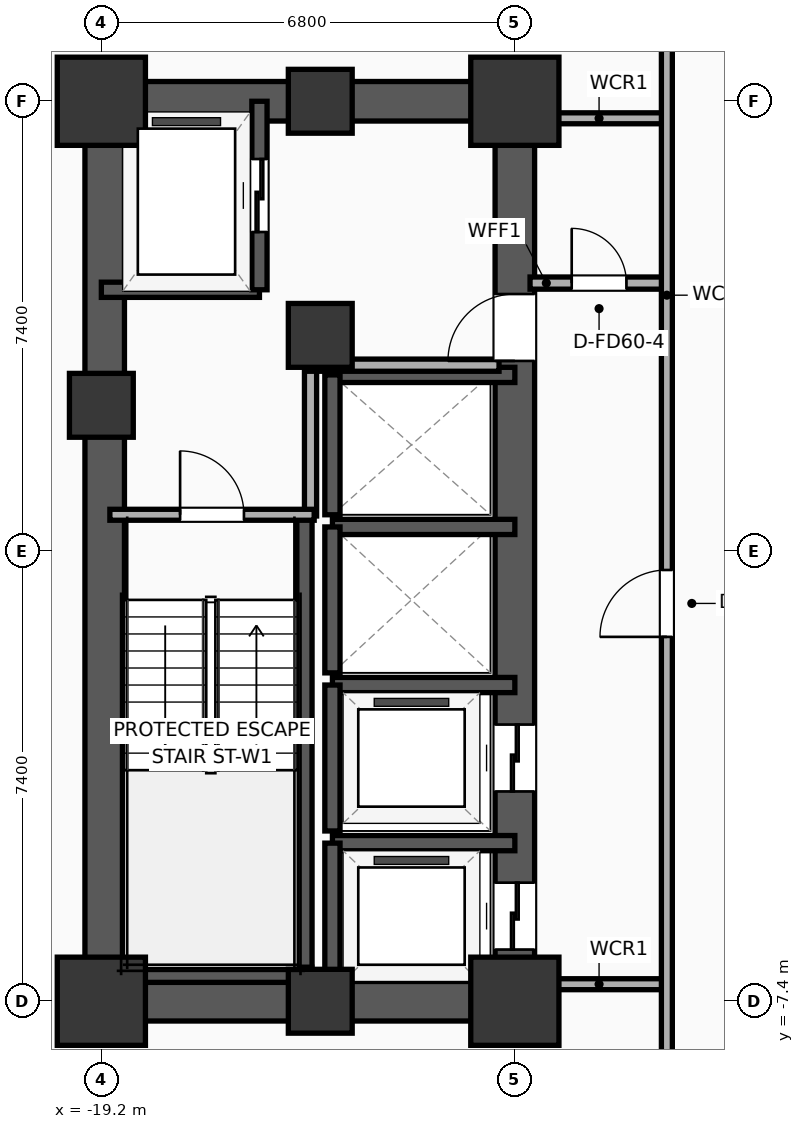
"""IFC4 building model, lengths in metres.
Left out: names, types, materials, properties, quantities, classifications, styles, units other than length and angle.
Written with IfcOpenShell. Run it as: python <this file> out.ifc"""

import sys

from ifc_helpers import new_model, si_unit, direction, frame, frame_2d, origin, origin_2d, place, context, subcontext, project, spatial, rectangle, extrude, element, fill, save


model = new_model("IFC4")
c1 = context("Model", 3, precision=1e-05, world=origin(), true_north=direction((0.0, 1.0)))
c2 = subcontext(c1, "Body", "Model", "MODEL_VIEW")
j1 = project(units=[si_unit("LENGTHUNIT", "METRE"), si_unit("PLANEANGLEUNIT", "RADIAN")], contexts=[c1])
p1 = place(None, origin())
s1 = spatial("IfcSite", under=j1, at=p1, CompositionType="ELEMENT")
p2 = place(p1, origin())
s2 = spatial("IfcBuilding", under=s1, at=p2, CompositionType="ELEMENT")
p3 = place(p2, frame((0.0, 0.0, 37.7)))
s3 = spatial("IfcBuildingStorey", under=s2, at=p3, CompositionType="ELEMENT", Elevation=37.7)
p4 = place(p3, frame((-19.2, -7.4, 0.0), z_axis=(0.0, 0.0, 1.0), x_axis=(1.0, 0.0, 0.0)))
e1 = element("IfcColumn", 1, at=p4, inside=s3, PredefinedType="COLUMN", context=c2, shape_type="SweptSolid", body=[
    extrude(rectangle(XDim=1.45, YDim=1.45, at=origin_2d()), origin(), (0.0, 0.0, 1.0), 3.9),
])
p5 = place(p3, frame((-19.2, 2.4, 0.0), z_axis=(0.0, 0.0, 1.0), x_axis=(1.0, 0.0, 0.0)))
e2 = element("IfcColumn", 2, at=p5, inside=s3, PredefinedType="COLUMN", context=c2, shape_type="SweptSolid", body=[
    extrude(rectangle(XDim=1.05, YDim=1.05, at=origin_2d()), origin(), (0.0, 0.0, 1.0), 3.9),
])
p6 = place(p3, frame((-19.2, 7.4, 0.0), z_axis=(0.0, 0.0, 1.0), x_axis=(1.0, 0.0, 0.0)))
e3 = element("IfcColumn", 3, at=p6, inside=s3, PredefinedType="COLUMN", context=c2, shape_type="SweptSolid", body=[
    extrude(rectangle(XDim=1.45, YDim=1.45, at=origin_2d()), origin(), (0.0, 0.0, 1.0), 3.9),
])
for number, where, z_axis, x_axis in (
    (4, (-15.6, -7.4, 0.0), (0.0, 0.0, 1.0), (1.0, 0.0, 0.0)),
    (5, (-15.6, 7.4, 0.0), (0.0, 0.0, 1.0), (1.0, 0.0, 0.0)),
):
    element("IfcColumn", number, at=place(p3, frame(where, z_axis=z_axis, x_axis=x_axis)), inside=s3, PredefinedType="COLUMN", context=c2, shape_type="SweptSolid", body=[
        extrude(rectangle(XDim=1.05, YDim=1.05, at=origin_2d()), origin(), (0.0, 0.0, 1.0), 3.9),
    ])
p7 = place(p3, frame((-12.4, -7.4, 0.0), z_axis=(0.0, 0.0, 1.0), x_axis=(1.0, 0.0, 0.0)))
e6 = element("IfcColumn", 6, at=p7, inside=s3, PredefinedType="COLUMN", context=c2, shape_type="SweptSolid", body=[
    extrude(rectangle(XDim=1.45, YDim=1.45, at=origin_2d()), origin(), (0.0, 0.0, 1.0), 3.9),
])
p8 = place(p3, frame((-15.6, 3.55, 0.0), z_axis=(0.0, 0.0, 1.0), x_axis=(1.0, 0.0, 0.0)))
e7 = element("IfcColumn", 7, at=p8, inside=s3, PredefinedType="COLUMN", context=c2, shape_type="SweptSolid", body=[
    extrude(rectangle(XDim=1.05, YDim=1.05, at=origin_2d()), origin(), (0.0, 0.0, 1.0), 3.9),
])
p9 = place(p3, frame((-12.4, 7.4, 0.0), z_axis=(0.0, 0.0, 1.0), x_axis=(1.0, 0.0, 0.0)))
e8 = element("IfcColumn", 8, at=p9, inside=s3, PredefinedType="COLUMN", context=c2, shape_type="SweptSolid", body=[
    extrude(rectangle(XDim=1.45, YDim=1.45, at=origin_2d()), origin(), (0.0, 0.0, 1.0), 3.9),
])
for number, where, z_axis, x_axis in (
    (9, (-19.525, -7.4, 0.0), (0.0, 0.0, 1.0), (1.0, 0.0, 0.0)),
    (10, (-19.525, 7.4, 0.0), (0.0, 0.0, 1.0), (1.0, 0.0, 0.0)),
):
    element("IfcWall", number, at=place(p3, frame(where, z_axis=z_axis, x_axis=x_axis)), inside=s3, PredefinedType="SHEAR", context=c2, shape_type="SweptSolid", body=[
        extrude(rectangle(XDim=7.45, YDim=0.65, at=frame_2d((3.725, 0.0))), origin(), (0.0, 0.0, 1.0), 3.65),
    ])
p10 = place(p3, frame((-19.145, -7.4, 0.0), z_axis=(0.0, 0.0, 1.0), x_axis=(0.0, 1.0, 0.0)))
e11 = element("IfcWall", 11, at=p10, inside=s3, PredefinedType="SHEAR", context=c2, shape_type="SweptSolid", body=[
    extrude(rectangle(XDim=14.8, YDim=0.65, at=frame_2d((7.4, 0.0))), origin(), (0.0, 0.0, 1.0), 3.65),
])
p11 = place(p3, frame((-12.4, -7.4, 0.0), z_axis=(0.0, 0.0, 1.0), x_axis=(0.0, 1.0, 0.0)))
e12 = element("IfcWall", 12, at=p11, inside=s3, PredefinedType="SHEAR", context=c2, shape_type="SweptSolid", body=[
    extrude(rectangle(XDim=14.8, YDim=0.65, at=frame_2d((7.4, 0.0))), origin(), (0.0, 0.0, 1.0), 3.65),
])
p12 = place(p11, frame((0.85, 0.0, 0.0)))
e13 = element("IfcOpeningElement", 13, at=p12, cuts=e12, PredefinedType="OPENING", context=c2, shape_type="SweptSolid", body=[
    extrude(rectangle(XDim=1.1, YDim=2.05, at=frame_2d((0.55, 1.025))), frame((0.0, 0.335, 0.0), z_axis=(0.0, -1.0, 0.0), x_axis=(1.0, 0.0, 0.0)), (0.0, 0.0, 1.0), 0.67),
])
p13 = place(p11, frame((3.45, 0.0, 0.0)))
e14 = element("IfcOpeningElement", 14, at=p13, cuts=e12, PredefinedType="OPENING", context=c2, shape_type="SweptSolid", body=[
    extrude(rectangle(XDim=1.1, YDim=2.05, at=frame_2d((0.55, 1.025))), frame((0.0, 0.335, 0.0), z_axis=(0.0, -1.0, 0.0), x_axis=(1.0, 0.0, 0.0)), (0.0, 0.0, 1.0), 0.67),
])
p14 = place(p11, frame((10.53, 0.0, 0.0)))
e15 = element("IfcOpeningElement", 15, at=p14, cuts=e12, PredefinedType="OPENING", context=c2, shape_type="SweptSolid", body=[
    extrude(rectangle(XDim=1.1, YDim=2.05, at=frame_2d((0.55, 1.025))), frame((0.0, 0.335, 0.0), z_axis=(0.0, -1.0, 0.0), x_axis=(1.0, 0.0, 0.0)), (0.0, 0.0, 1.0), 0.67),
])
p15 = place(p3, frame((-15.86, -7.085, 0.0), z_axis=(0.0, 0.0, 1.0), x_axis=(0.0, 1.0, 0.0)))
e16 = element("IfcWall", 16, at=p15, inside=s3, PredefinedType="SOLIDWALL", context=c2, shape_type="SweptSolid", body=[
    extrude(rectangle(XDim=7.685, YDim=0.25, at=frame_2d((3.843, 0.0))), origin(), (0.0, 0.0, 1.0), 3.65),
])
p16 = place(p3, frame((-19.2, -6.965, 0.0), z_axis=(0.0, 0.0, 1.0), x_axis=(1.0, 0.0, 0.0)))
e17 = element("IfcWall", 17, at=p16, inside=s3, PredefinedType="SOLIDWALL", context=c2, shape_type="SweptSolid", body=[
    extrude(rectangle(XDim=3.46, YDim=0.25, at=frame_2d((1.73, 0.0))), origin(), (0.0, 0.0, 1.0), 3.65),
])
p17 = place(p3, frame((-19.2, 4.3, 0.0), z_axis=(0.0, 0.0, 1.0), x_axis=(1.0, 0.0, 0.0)))
e18 = element("IfcWall", 18, at=p17, inside=s3, PredefinedType="SOLIDWALL", context=c2, shape_type="SweptSolid", body=[
    extrude(rectangle(XDim=2.6, YDim=0.25, at=frame_2d((1.3, 0.0))), origin(), (0.0, 0.0, 1.0), 3.65),
])
p18 = place(p3, frame((-16.6, 4.3, 0.0), z_axis=(0.0, 0.0, 1.0), x_axis=(0.0, 1.0, 0.0)))
e19 = element("IfcWall", 19, at=p18, inside=s3, PredefinedType="SOLIDWALL", context=c2, shape_type="SweptSolid", body=[
    extrude(rectangle(XDim=3.1, YDim=0.25, at=frame_2d((1.55, 0.0))), origin(), (0.0, 0.0, 1.0), 3.65),
])
p19 = place(p18, frame((0.95, 0.0, 0.0)))
e20 = element("IfcOpeningElement", 20, at=p19, cuts=e19, PredefinedType="OPENING", context=c2, shape_type="SweptSolid", body=[
    extrude(rectangle(XDim=1.2, YDim=2.05, at=frame_2d((0.6, 1.025))), frame((0.0, 0.135, 0.0), z_axis=(0.0, -1.0, 0.0), x_axis=(1.0, 0.0, 0.0)), (0.0, 0.0, 1.0), 0.27),
])
p20 = place(p3, frame((-12.4, -4.8, 0.0), z_axis=(0.0, 0.0, 1.0), x_axis=(-1.0, 0.0, 0.0)))
e21 = element("IfcWall", 21, at=p20, inside=s3, PredefinedType="SOLIDWALL", context=c2, shape_type="SweptSolid", body=[
    extrude(rectangle(XDim=3.0, YDim=0.25, at=frame_2d((1.5, 0.0))), origin(), (0.0, 0.0, 1.0), 3.65),
])
p21 = place(p3, frame((-15.4, -4.8, 0.0), z_axis=(0.0, 0.0, 1.0), x_axis=(0.0, -1.0, 0.0)))
e22 = element("IfcWall", 22, at=p21, inside=s3, PredefinedType="SOLIDWALL", context=c2, shape_type="SweptSolid", body=[
    extrude(rectangle(XDim=2.6, YDim=0.25, at=frame_2d((1.3, 0.0))), origin(), (0.0, 0.0, 1.0), 3.65),
])
p22 = place(p3, frame((-12.4, -2.2, 0.0), z_axis=(0.0, 0.0, 1.0), x_axis=(-1.0, 0.0, 0.0)))
e23 = element("IfcWall", 23, at=p22, inside=s3, PredefinedType="SOLIDWALL", context=c2, shape_type="SweptSolid", body=[
    extrude(rectangle(XDim=3.0, YDim=0.25, at=frame_2d((1.5, 0.0))), origin(), (0.0, 0.0, 1.0), 3.65),
])
p23 = place(p3, frame((-15.4, -2.2, 0.0), z_axis=(0.0, 0.0, 1.0), x_axis=(0.0, -1.0, 0.0)))
e24 = element("IfcWall", 24, at=p23, inside=s3, PredefinedType="SOLIDWALL", context=c2, shape_type="SweptSolid", body=[
    extrude(rectangle(XDim=2.4, YDim=0.25, at=frame_2d((1.2, 0.0))), origin(), (0.0, 0.0, 1.0), 3.65),
])
p24 = place(p3, frame((-12.4, 0.4, 0.0), z_axis=(0.0, 0.0, 1.0), x_axis=(-1.0, 0.0, 0.0)))
e25 = element("IfcWall", 25, at=p24, inside=s3, PredefinedType="SOLIDWALL", context=c2, shape_type="SweptSolid", body=[
    extrude(rectangle(XDim=3.0, YDim=0.25, at=frame_2d((1.5, 0.0))), origin(), (0.0, 0.0, 1.0), 3.65),
])
p25 = place(p3, frame((-15.4, 0.4, 0.0), z_axis=(0.0, 0.0, 1.0), x_axis=(0.0, -1.0, 0.0)))
e26 = element("IfcWall", 26, at=p25, inside=s3, PredefinedType="SOLIDWALL", context=c2, shape_type="SweptSolid", body=[
    extrude(rectangle(XDim=2.4, YDim=0.25, at=frame_2d((1.2, 0.0))), origin(), (0.0, 0.0, 1.0), 3.65),
])
p26 = place(p3, frame((-12.4, 2.9, 0.0), z_axis=(0.0, 0.0, 1.0), x_axis=(-1.0, 0.0, 0.0)))
e27 = element("IfcWall", 27, at=p26, inside=s3, PredefinedType="SOLIDWALL", context=c2, shape_type="SweptSolid", body=[
    extrude(rectangle(XDim=3.0, YDim=0.25, at=frame_2d((1.5, 0.0))), origin(), (0.0, 0.0, 1.0), 3.65),
])
p27 = place(p3, frame((-15.4, 2.9, 0.0), z_axis=(0.0, 0.0, 1.0), x_axis=(0.0, -1.0, 0.0)))
e28 = element("IfcWall", 28, at=p27, inside=s3, PredefinedType="SOLIDWALL", context=c2, shape_type="SweptSolid", body=[
    extrude(rectangle(XDim=2.3, YDim=0.25, at=frame_2d((1.15, 0.0))), origin(), (0.0, 0.0, 1.0), 3.65),
])
p28 = place(p3, frame((-15.76, 0.58, 0.0), z_axis=(0.0, 0.0, 1.0), x_axis=(0.0, 1.0, 0.0)))
e29 = element("IfcWall", 29, at=p28, inside=s3, PredefinedType="PARTITIONING", context=c2, shape_type="SweptSolid", body=[
    extrude(rectangle(XDim=2.52, YDim=0.2, at=frame_2d((1.26, 0.0))), origin(), (0.0, 0.0, 1.0), 3.65),
])
p29 = place(p3, frame((-15.82, 3.06, 0.0), z_axis=(0.0, 0.0, 1.0), x_axis=(1.0, 0.0, 0.0)))
e30 = element("IfcWall", 30, at=p29, inside=s3, PredefinedType="PARTITIONING", context=c2, shape_type="SweptSolid", body=[
    extrude(rectangle(XDim=3.16, YDim=0.2, at=frame_2d((1.58, 0.0))), origin(), (0.0, 0.0, 1.0), 3.65),
])
p30 = place(p3, frame((-19.06, 0.6, 0.0), z_axis=(0.0, 0.0, 1.0), x_axis=(1.0, 0.0, 0.0)))
e31 = element("IfcWall", 31, at=p30, inside=s3, PredefinedType="PARTITIONING", context=c2, shape_type="SweptSolid", body=[
    extrude(rectangle(XDim=3.36, YDim=0.18, at=frame_2d((1.68, 0.0))), origin(), (0.0, 0.0, 1.0), 3.65),
])
p31 = place(p30, frame((1.155, 0.0, 0.0)))
e32 = element("IfcOpeningElement", 32, at=p31, cuts=e31, PredefinedType="OPENING", context=c2, shape_type="SweptSolid", body=[
    extrude(rectangle(XDim=1.05, YDim=2.05, at=frame_2d((0.525, 1.025))), frame((0.0, 0.1, 0.0), z_axis=(0.0, -1.0, 0.0), x_axis=(1.0, 0.0, 0.0)), (0.0, 0.0, 1.0), 0.2),
])
p32 = place(p3, frame((-12.15, 4.41, 0.0), z_axis=(0.0, 0.0, 1.0), x_axis=(1.0, 0.0, 0.0)))
e33 = element("IfcWall", 33, at=p32, inside=s3, PredefinedType="PARTITIONING", context=c2, shape_type="SweptSolid", body=[
    extrude(rectangle(XDim=2.27, YDim=0.2, at=frame_2d((1.135, 0.0))), origin(), (0.0, 0.0, 1.0), 3.65),
])
p33 = place(p32, frame((0.685, 0.0, 0.0)))
e34 = element("IfcOpeningElement", 34, at=p33, cuts=e33, PredefinedType="OPENING", context=c2, shape_type="SweptSolid", body=[
    extrude(rectangle(XDim=0.9, YDim=2.05, at=frame_2d((0.45, 1.025))), frame((0.0, 0.11, 0.0), z_axis=(0.0, -1.0, 0.0), x_axis=(1.0, 0.0, 0.0)), (0.0, 0.0, 1.0), 0.22),
])
for number, where, z_axis, x_axis in (
    (35, (-12.15, 7.12, 0.0), (0.0, 0.0, 1.0), (1.0, 0.0, 0.0)),
    (36, (-12.15, -7.12, 0.0), (0.0, 0.0, 1.0), (1.0, 0.0, 0.0)),
):
    element("IfcWall", number, at=place(p3, frame(where, z_axis=z_axis, x_axis=x_axis)), inside=s3, PredefinedType="PARTITIONING", context=c2, shape_type="SweptSolid", body=[
        extrude(rectangle(XDim=2.27, YDim=0.18, at=frame_2d((1.135, 0.0))), origin(), (0.0, 0.0, 1.0), 2.94),
    ])
p34 = place(p3, frame((-9.9, -8.58, 0.0), z_axis=(0.0, 0.0, 1.0), x_axis=(0.0, 1.0, 0.0)))
e37 = element("IfcWall", 37, at=p34, inside=s3, PredefinedType="PARTITIONING", context=c2, shape_type="SweptSolid", body=[
    extrude(rectangle(XDim=17.16, YDim=0.18, at=frame_2d((8.58, 0.0))), origin(), (0.0, 0.0, 1.0), 3.65),
])
p35 = place(p34, frame((7.172, 0.0, 0.0)))
e38 = element("IfcOpeningElement", 38, at=p35, cuts=e37, PredefinedType="OPENING", context=c2, shape_type="SweptSolid", body=[
    extrude(rectangle(XDim=1.1, YDim=2.05, at=frame_2d((0.55, 1.025))), frame((0.0, 0.1, 0.0), z_axis=(0.0, -1.0, 0.0), x_axis=(1.0, 0.0, 0.0)), (0.0, 0.0, 1.0), 0.2),
])
p36 = place(p19, origin())
e39 = element("IfcDoor", 39, at=p36, inside=s3, OperationType="SLIDING_TO_LEFT", PredefinedType="DOOR", context=c2, shape_type="SweptSolid", body=[
    extrude(rectangle(XDim=1.2, YDim=2.05, at=frame_2d((0.6, 1.025))), frame((0.0, 0.025, 0.0), z_axis=(0.0, -1.0, 0.0), x_axis=(1.0, 0.0, 0.0)), (0.0, 0.0, 1.0), 0.05),
])
fill(e20, e39)
p37 = place(p12, origin())
e40 = element("IfcDoor", 40, at=p37, inside=s3, OperationType="SLIDING_TO_LEFT", PredefinedType="DOOR", context=c2, shape_type="SweptSolid", body=[
    extrude(rectangle(XDim=1.1, YDim=2.05, at=frame_2d((0.55, 1.025))), frame((0.0, 0.025, 0.0), z_axis=(0.0, -1.0, 0.0), x_axis=(1.0, 0.0, 0.0)), (0.0, 0.0, 1.0), 0.05),
])
fill(e13, e40)
p38 = place(p13, origin())
e41 = element("IfcDoor", 41, at=p38, inside=s3, OperationType="SLIDING_TO_LEFT", PredefinedType="DOOR", context=c2, shape_type="SweptSolid", body=[
    extrude(rectangle(XDim=1.1, YDim=2.05, at=frame_2d((0.55, 1.025))), frame((0.0, 0.025, 0.0), z_axis=(0.0, -1.0, 0.0), x_axis=(1.0, 0.0, 0.0)), (0.0, 0.0, 1.0), 0.05),
])
fill(e14, e41)
p39 = place(p31, origin())
e42 = element("IfcDoor", 42, at=p39, inside=s3, OperationType="SINGLE_SWING_LEFT", PredefinedType="DOOR", context=c2, shape_type="SweptSolid", body=[
    extrude(rectangle(XDim=1.05, YDim=2.05, at=frame_2d((0.525, 1.025))), frame((0.0, 0.025, 0.0), z_axis=(0.0, -1.0, 0.0), x_axis=(1.0, 0.0, 0.0)), (0.0, 0.0, 1.0), 0.05),
])
fill(e32, e42)
p40 = place(p33, origin())
e43 = element("IfcDoor", 43, at=p40, inside=s3, OperationType="SINGLE_SWING_LEFT", PredefinedType="DOOR", context=c2, shape_type="SweptSolid", body=[
    extrude(rectangle(XDim=0.9, YDim=2.05, at=frame_2d((0.45, 1.025))), frame((0.0, 0.025, 0.0), z_axis=(0.0, -1.0, 0.0), x_axis=(1.0, 0.0, 0.0)), (0.0, 0.0, 1.0), 0.05),
])
fill(e34, e43)
p41 = place(p35, origin())
e44 = element("IfcDoor", 44, at=p41, inside=s3, OperationType="SINGLE_SWING_LEFT", PredefinedType="DOOR", context=c2, shape_type="SweptSolid", body=[
    extrude(rectangle(XDim=1.1, YDim=2.05, at=frame_2d((0.55, 1.025))), frame((0.0, 0.025, 0.0), z_axis=(0.0, -1.0, 0.0), x_axis=(1.0, 0.0, 0.0)), (0.0, 0.0, 1.0), 0.05),
])
fill(e38, e44)
p42 = place(p14, origin())
e45 = element("IfcDoor", 45, at=p42, inside=s3, OperationType="SINGLE_SWING_LEFT", PredefinedType="DOOR", context=c2, shape_type="SweptSolid", body=[
    extrude(rectangle(XDim=1.1, YDim=2.05, at=frame_2d((0.55, 1.025))), frame((0.0, 0.025, 0.0), z_axis=(0.0, -1.0, 0.0), x_axis=(1.0, 0.0, 0.0)), (0.0, 0.0, 1.0), 0.05),
])
fill(e15, e45)
save(model, sys.argv[1])
